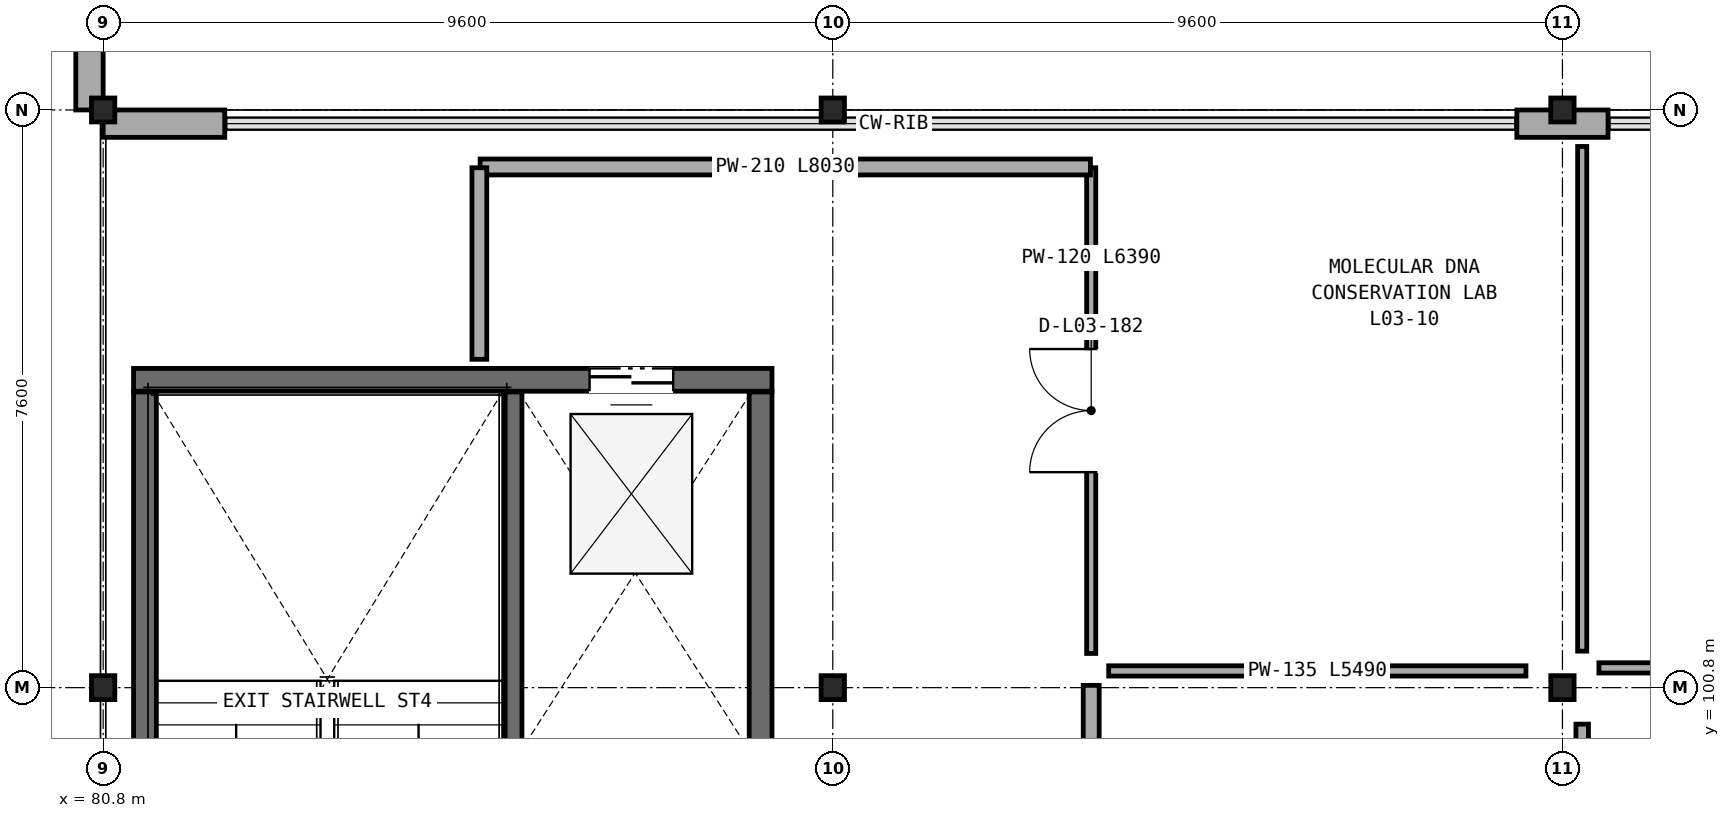
"""IFC4 building model, lengths in metres.
Left out: names, types, materials, properties, quantities, classifications, styles, units other than length and angle.
Written with IfcOpenShell. Run it as: python <this file> out.ifc"""

import sys

from ifc_helpers import new_model, si_unit, direction, frame, frame_2d, origin, origin_2d, place, context, subcontext, project, spatial, rectangle, i_section, extrude, element, fill, save


model = new_model("IFC4")
c1 = context("Model", 3, precision=1e-05, world=origin(), true_north=direction((0.0, 1.0)))
c2 = subcontext(c1, "Body", "Model", "MODEL_VIEW")
j1 = project(units=[si_unit("LENGTHUNIT", "METRE"), si_unit("PLANEANGLEUNIT", "RADIAN")], contexts=[c1])
p1 = place(None, origin())
s1 = spatial("IfcSite", under=j1, at=p1, CompositionType="ELEMENT")
p2 = place(p1, origin())
s2 = spatial("IfcBuilding", under=s1, at=p2, CompositionType="ELEMENT")
p3 = place(p2, frame((0.0, 0.0, 14.6)))
s3 = spatial("IfcBuildingStorey", under=s2, at=p3, CompositionType="ELEMENT", Elevation=14.6)
for number, where, z_axis, x_axis in (
    (1, (90.4, 100.8, 0.0), (0.0, 0.0, 1.0), (1.0, 0.0, 0.0)),
    (2, (90.4, 108.4, 0.0), (0.0, 0.0, 1.0), (1.0, 0.0, 0.0)),
    (3, (100.0, 100.8, 0.0), (0.0, 0.0, 1.0), (1.0, 0.0, 0.0)),
    (4, (100.0, 108.4, 0.0), (0.0, 0.0, 1.0), (1.0, 0.0, 0.0)),
    (5, (80.8, 100.8, 0.0), (0.0, 0.0, 1.0), (1.0, 0.0, 0.0)),
    (6, (80.8, 108.4, 0.0), (0.0, 0.0, 1.0), (1.0, 0.0, 0.0)),
):
    element("IfcColumn", number, at=place(p3, frame(where, z_axis=z_axis, x_axis=x_axis)), inside=s3, PredefinedType="COLUMN", context=c2, shape_type="SweptSolid", body=[
        extrude(i_section(OverallWidth=0.307, OverallDepth=0.315, WebThickness=0.012, FlangeThickness=0.019, FilletRadius=0.017, at=origin_2d()), origin(), (0.0, 0.0, 1.0), 4.5),
    ])
p4 = place(p3, frame((100.6, 108.22, 0.0), z_axis=(0.0, 0.0, 1.0), x_axis=(-1.0, 0.0, 0.0)))
e7 = element("IfcWall", 7, at=p4, inside=s3, PredefinedType="SOLIDWALL", context=c2, shape_type="SweptSolid", body=[
    extrude(rectangle(XDim=1.2, YDim=0.36, at=frame_2d((0.6, 0.0))), origin(), (0.0, 0.0, 1.0), 3.702),
])
p5 = place(p3, frame((82.4, 108.22, 0.0), z_axis=(0.0, 0.0, 1.0), x_axis=(-1.0, 0.0, 0.0)))
e8 = element("IfcWall", 8, at=p5, inside=s3, PredefinedType="SOLIDWALL", context=c2, shape_type="SweptSolid", body=[
    extrude(rectangle(XDim=1.6, YDim=0.36, at=frame_2d((0.8, 0.0))), origin(), (0.0, 0.0, 1.0), 3.662),
])
p6 = place(p3, frame((80.62, 108.4, 0.0), z_axis=(0.0, 0.0, 1.0), x_axis=(0.0, 1.0, 0.0)))
e9 = element("IfcWall", 9, at=p6, inside=s3, PredefinedType="SOLIDWALL", context=c2, shape_type="SweptSolid", body=[
    extrude(rectangle(XDim=6.8, YDim=0.36, at=frame_2d((3.4, 0.0))), origin(), (0.0, 0.0, 1.0), 3.662),
])
p7 = place(p3, frame((89.6, 104.85, 0.0), z_axis=(0.0, 0.0, 1.0), x_axis=(-1.0, 0.0, 0.0)))
e10 = element("IfcWall", 10, at=p7, inside=s3, PredefinedType="SHEAR", context=c2, shape_type="SweptSolid", body=[
    extrude(rectangle(XDim=8.4, YDim=0.3, at=frame_2d((4.2, 0.0))), origin(), (0.0, 0.0, 1.0), 4.245),
])
p8 = place(p7, frame((1.3, 0.0, 0.0)))
e11 = element("IfcOpeningElement", 11, at=p8, cuts=e10, PredefinedType="OPENING", context=c2, shape_type="SweptSolid", body=[
    extrude(rectangle(XDim=1.1, YDim=2.2, at=frame_2d((0.55, 1.1))), frame((0.0, 0.16, 0.0), z_axis=(0.0, -1.0, 0.0), x_axis=(1.0, 0.0, 0.0)), (0.0, 0.0, 1.0), 0.32),
])
for number, where, z_axis, x_axis in (
    (12, (89.45, 94.91, 0.0), (0.0, 0.0, 1.0), (0.0, 1.0, 0.0)),
    (13, (81.35, 104.69, 0.0), (0.0, 0.0, 1.0), (0.0, -1.0, 0.0)),
):
    element("IfcWall", number, at=place(p3, frame(where, z_axis=z_axis, x_axis=x_axis)), inside=s3, PredefinedType="SHEAR", context=c2, shape_type="SweptSolid", body=[
        extrude(rectangle(XDim=9.78, YDim=0.3, at=frame_2d((4.89, 0.0))), origin(), (0.0, 0.0, 1.0), 4.245),
    ])
p9 = place(p3, frame((86.19, 94.91, 0.0), z_axis=(0.0, 0.0, 1.0), x_axis=(0.0, 1.0, 0.0)))
e14 = element("IfcWall", 14, at=p9, inside=s3, PredefinedType="SOLIDWALL", context=c2, shape_type="SweptSolid", body=[
    extrude(rectangle(XDim=9.78, YDim=0.24, at=frame_2d((4.89, 0.0))), origin(), (0.0, 0.0, 1.0), 4.245),
])
p10 = place(p3, frame((93.8, 101.25, 0.0), z_axis=(0.0, 0.0, 1.0), x_axis=(0.0, 1.0, 0.0)))
e15 = element("IfcWall", 15, at=p10, inside=s3, PredefinedType="PARTITIONING", context=c2, shape_type="SweptSolid", body=[
    extrude(rectangle(XDim=6.39, YDim=0.12, at=frame_2d((3.195, 0.0))), origin(), (0.0, 0.0, 1.0), 4.13),
])
p11 = place(p10, frame((2.385, 0.0, 0.0)))
e16 = element("IfcOpeningElement", 16, at=p11, cuts=e15, PredefinedType="OPENING", context=c2, shape_type="SweptSolid", body=[
    extrude(rectangle(XDim=1.62, YDim=2.46, at=frame_2d((0.81, 1.23))), frame((0.0, 0.07, 0.0), z_axis=(0.0, -1.0, 0.0), x_axis=(1.0, 0.0, 0.0)), (0.0, 0.0, 1.0), 0.14),
])
p12 = place(p3, frame((93.79, 107.65, 0.0), z_axis=(0.0, 0.0, 1.0), x_axis=(-1.0, 0.0, 0.0)))
e17 = element("IfcWall", 17, at=p12, inside=s3, PredefinedType="PARTITIONING", context=c2, shape_type="SweptSolid", body=[
    extrude(rectangle(XDim=8.03, YDim=0.21, at=frame_2d((4.015, 0.0))), origin(), (0.0, 0.0, 1.0), 3.763),
])
p13 = place(p3, frame((85.75, 107.64, 0.0), z_axis=(0.0, 0.0, 1.0), x_axis=(0.0, -1.0, 0.0)))
e18 = element("IfcWall", 18, at=p13, inside=s3, PredefinedType="PARTITIONING", context=c2, shape_type="SweptSolid", body=[
    extrude(rectangle(XDim=2.52, YDim=0.195, at=frame_2d((1.26, 0.0))), origin(), (0.0, 0.0, 1.0), 4.13),
])
p14 = place(p3, frame((93.8, 83.65, 0.0), z_axis=(0.0, 0.0, 1.0), x_axis=(0.0, 1.0, 0.0)))
e19 = element("IfcWall", 19, at=p14, inside=s3, PredefinedType="PARTITIONING", context=c2, shape_type="SweptSolid", body=[
    extrude(rectangle(XDim=17.18, YDim=0.21, at=frame_2d((8.59, 0.0))), origin(), (0.0, 0.0, 1.0), 3.687),
])
p15 = place(p14, frame((7.52, 0.0, 0.0)))
e20 = element("IfcOpeningElement", 20, at=p15, cuts=e19, PredefinedType="OPENING", context=c2, shape_type="SweptSolid", body=[
    extrude(rectangle(XDim=2.14, YDim=2.46, at=frame_2d((1.07, 1.23))), frame((0.0, 0.115, 0.0), z_axis=(0.0, -1.0, 0.0), x_axis=(1.0, 0.0, 0.0)), (0.0, 0.0, 1.0), 0.23),
])
p16 = place(p3, frame((99.52, 101.02, 0.0), z_axis=(0.0, 0.0, 1.0), x_axis=(-1.0, 0.0, 0.0)))
e21 = element("IfcWall", 21, at=p16, inside=s3, PredefinedType="PARTITIONING", context=c2, shape_type="SweptSolid", body=[
    extrude(rectangle(XDim=5.49, YDim=0.135, at=frame_2d((2.745, 0.0))), origin(), (0.0, 0.0, 1.0), 3.687),
])
p17 = place(p3, frame((100.26, 107.92, 0.0), z_axis=(0.0, 0.0, 1.0), x_axis=(0.0, -1.0, 0.0)))
e22 = element("IfcWall", 22, at=p17, inside=s3, PredefinedType="PARTITIONING", context=c2, shape_type="SweptSolid", body=[
    extrude(rectangle(XDim=6.64, YDim=0.12, at=frame_2d((3.32, 0.0))), origin(), (0.0, 0.0, 1.0), 3.763),
])
p18 = place(p3, frame((100.26, 100.32, 0.0), z_axis=(0.0, 0.0, 1.0), x_axis=(0.0, -1.0, 0.0)))
e23 = element("IfcWall", 23, at=p18, inside=s3, PredefinedType="PARTITIONING", context=c2, shape_type="SweptSolid", body=[
    extrude(rectangle(XDim=16.64, YDim=0.165, at=frame_2d((8.32, 0.0))), origin(), (0.0, 0.0, 1.0), 3.687),
])
p19 = place(p3, frame((100.48, 101.06, 0.0), z_axis=(0.0, 0.0, 1.0), x_axis=(1.0, 0.0, 0.0)))
e24 = element("IfcWall", 24, at=p19, inside=s3, PredefinedType="PARTITIONING", context=c2, shape_type="SweptSolid", body=[
    extrude(rectangle(XDim=5.49, YDim=0.135, at=frame_2d((2.745, 0.0))), origin(), (0.0, 0.0, 1.0), 3.687),
])
p20 = place(p8, origin())
e25 = element("IfcDoor", 25, at=p20, inside=s3, OperationType="DOUBLE_DOOR_SLIDING", PredefinedType="DOOR", context=c2, shape_type="SweptSolid", body=[
    extrude(rectangle(XDim=1.1, YDim=2.2, at=frame_2d((0.55, 1.1))), frame((0.0, 0.025, 0.0), z_axis=(0.0, -1.0, 0.0), x_axis=(1.0, 0.0, 0.0)), (0.0, 0.0, 1.0), 0.05),
])
fill(e11, e25)
p21 = place(p11, origin())
e26 = element("IfcDoor", 26, at=p21, inside=s3, OperationType="DOUBLE_DOOR_SINGLE_SWING", PredefinedType="DOOR", context=c2, shape_type="SweptSolid", body=[
    extrude(rectangle(XDim=1.62, YDim=2.46, at=frame_2d((0.81, 1.23))), frame((0.0, 0.025, 0.0), z_axis=(0.0, -1.0, 0.0), x_axis=(1.0, 0.0, 0.0)), (0.0, 0.0, 1.0), 0.05),
])
fill(e16, e26)
save(model, sys.argv[1])
